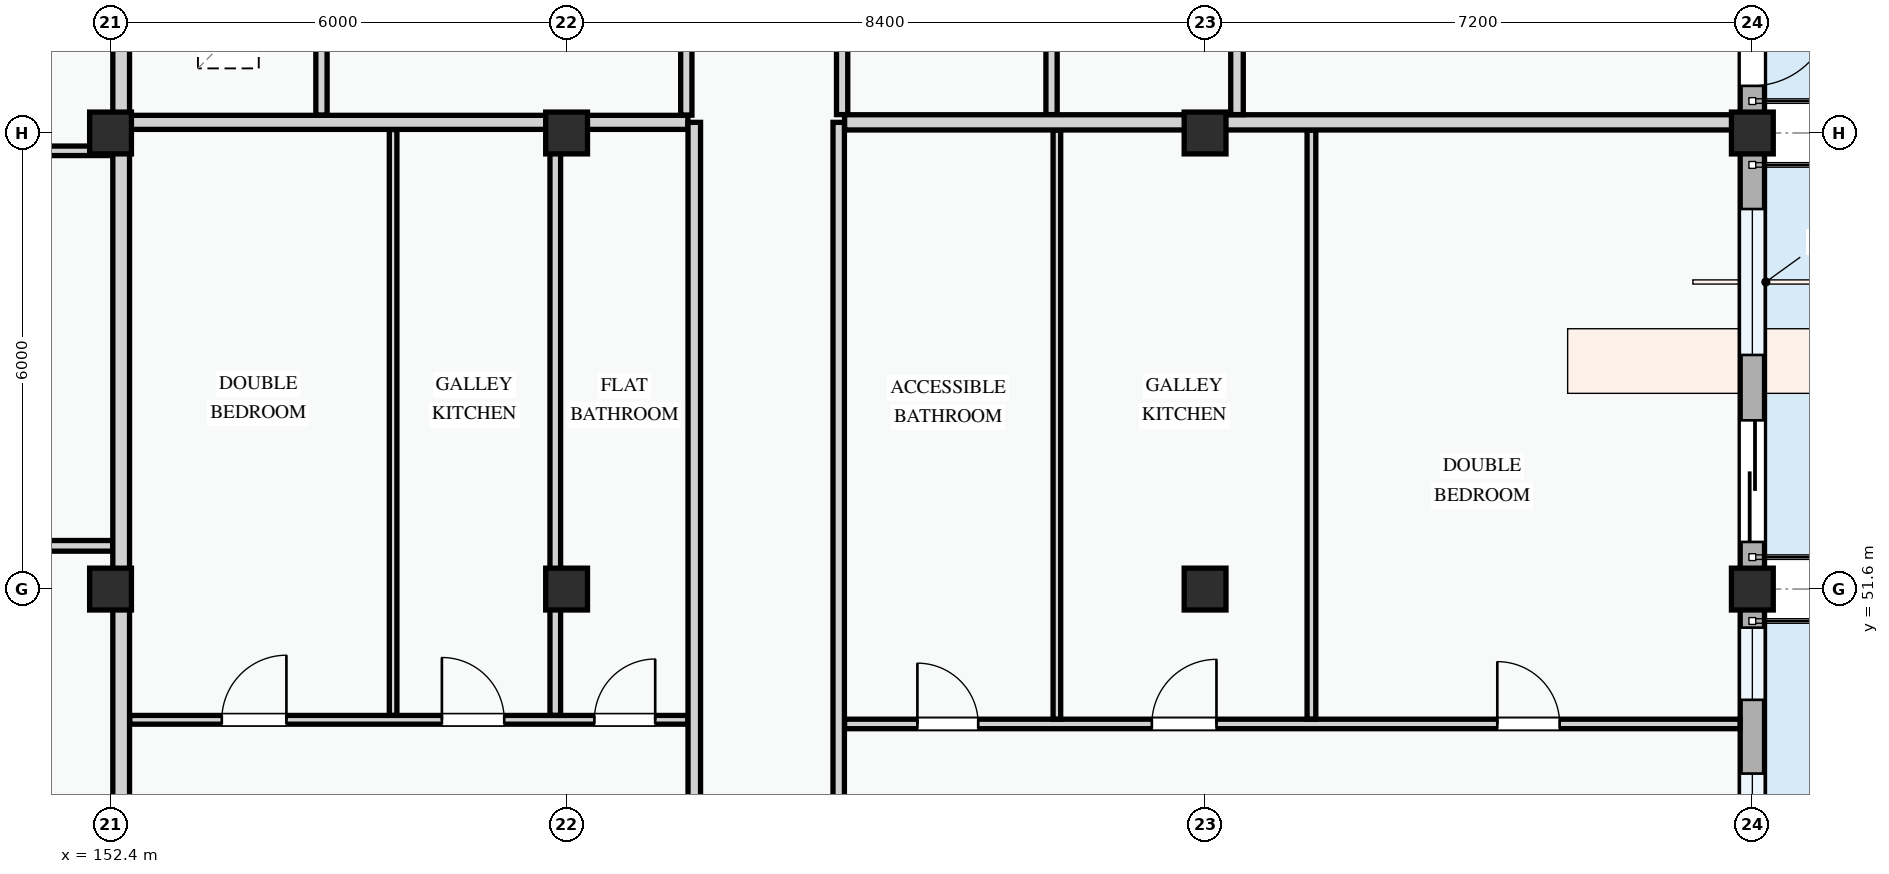
"""IFC4 building model, lengths in metres.
Left out: names, types, materials, properties, quantities, classifications, styles, units other than length and angle.
Written with IfcOpenShell. Run it as: python <this file> out.ifc"""

import sys

from ifc_helpers import new_model, si_unit, direction, frame, frame_2d, origin, origin_2d, place, context, subcontext, project, spatial, rectangle, extrude, element, fill, save


model = new_model("IFC4")
c1 = context("Model", 3, precision=1e-05, world=origin(), true_north=direction((0.0, 1.0)))
c2 = subcontext(c1, "Body", "Model", "MODEL_VIEW")
j1 = project(units=[si_unit("LENGTHUNIT", "METRE"), si_unit("PLANEANGLEUNIT", "RADIAN")], contexts=[c1])
p1 = place(None, origin())
s1 = spatial("IfcSite", under=j1, at=p1, CompositionType="ELEMENT")
p2 = place(p1, origin())
s2 = spatial("IfcBuilding", under=s1, at=p2, CompositionType="ELEMENT")
p3 = place(p2, frame((0.0, 0.0, 11.4)))
s3 = spatial("IfcBuildingStorey", under=s2, at=p3, CompositionType="ELEMENT", Elevation=11.4)
for number, where, z_axis, x_axis in (
    (1, (152.4, 51.6, 0.0), (0.0, 0.0, 1.0), (1.0, 0.0, 0.0)),
    (2, (152.4, 57.6, 0.0), (0.0, 0.0, 1.0), (1.0, 0.0, 0.0)),
    (3, (158.4, 51.6, 0.0), (0.0, 0.0, 1.0), (1.0, 0.0, 0.0)),
    (4, (158.4, 57.6, 0.0), (0.0, 0.0, 1.0), (1.0, 0.0, 0.0)),
    (5, (166.8, 51.6, 0.0), (0.0, 0.0, 1.0), (1.0, 0.0, 0.0)),
    (6, (166.8, 57.6, 0.0), (0.0, 0.0, 1.0), (1.0, 0.0, 0.0)),
    (7, (174.0, 51.6, 0.0), (0.0, 0.0, 1.0), (1.0, 0.0, 0.0)),
    (8, (174.0, 57.6, 0.0), (0.0, 0.0, 1.0), (1.0, 0.0, 0.0)),
):
    element("IfcColumn", number, at=place(p3, frame(where, z_axis=z_axis, x_axis=x_axis)), inside=s3, PredefinedType="COLUMN", context=c2, shape_type="SweptSolid", body=[
        extrude(rectangle(XDim=0.55, YDim=0.55, at=origin_2d()), origin(), (0.0, 0.0, 1.0), 3.3),
    ])
p4 = place(p3, frame((174.0, 43.2, 0.0), z_axis=(0.0, 0.0, 1.0), x_axis=(0.0, 1.0, 0.0)))
e9 = element("IfcWall", 9, at=p4, inside=s3, PredefinedType="STANDARD", context=c2, shape_type="SweptSolid", body=[
    extrude(rectangle(XDim=8.4, YDim=0.32, at=frame_2d((4.2, 0.0))), origin(), (0.0, 0.0, 1.0), 2.425),
])
p5 = place(p4, frame((2.15, 0.0, 0.0)))
e10 = element("IfcOpeningElement", 10, at=p5, cuts=e9, PredefinedType="OPENING", context=c2, shape_type="SweptSolid", body=[
    extrude(rectangle(XDim=1.5, YDim=2.2, at=frame_2d((0.75, 1.1))), frame((0.0, 0.17, 0.0), z_axis=(0.0, -1.0, 0.0), x_axis=(1.0, 0.0, 0.0)), (0.0, 0.0, 1.0), 0.34),
])
p6 = place(p4, frame((0.505, 0.0, 0.78)))
e11 = element("IfcOpeningElement", 11, at=p6, cuts=e9, PredefinedType="OPENING", context=c2, shape_type="SweptSolid", body=[
    extrude(rectangle(XDim=1.0, YDim=1.25, at=frame_2d((0.5, 0.625))), frame((0.0, 0.17, 0.0), z_axis=(0.0, -1.0, 0.0), x_axis=(1.0, 0.0, 0.0)), (0.0, 0.0, 1.0), 0.34),
])
p7 = place(p4, frame((4.353, 0.0, 0.78)))
e12 = element("IfcOpeningElement", 12, at=p7, cuts=e9, PredefinedType="OPENING", context=c2, shape_type="SweptSolid", body=[
    extrude(rectangle(XDim=1.62, YDim=1.38, at=frame_2d((0.81, 0.69))), frame((0.0, 0.17, 0.0), z_axis=(0.0, -1.0, 0.0), x_axis=(1.0, 0.0, 0.0)), (0.0, 0.0, 1.0), 0.34),
])
p8 = place(p4, frame((6.943, 0.0, 0.78)))
e13 = element("IfcOpeningElement", 13, at=p8, cuts=e9, PredefinedType="OPENING", context=c2, shape_type="SweptSolid", body=[
    extrude(rectangle(XDim=0.95, YDim=1.15, at=frame_2d((0.475, 0.575))), frame((0.0, 0.17, 0.0), z_axis=(0.0, -1.0, 0.0), x_axis=(1.0, 0.0, 0.0)), (0.0, 0.0, 1.0), 0.34),
])
p9 = place(p3, frame((174.0, 51.6, 0.0), z_axis=(0.0, 0.0, 1.0), x_axis=(0.0, 1.0, 0.0)))
e14 = element("IfcWall", 14, at=p9, inside=s3, PredefinedType="STANDARD", context=c2, shape_type="SweptSolid", body=[
    extrude(rectangle(XDim=6.0, YDim=0.32, at=frame_2d((3.0, 0.0))), origin(), (0.0, 0.0, 1.0), 2.575),
])
p10 = place(p9, frame((0.62, 0.0, 0.0)))
e15 = element("IfcOpeningElement", 15, at=p10, cuts=e14, PredefinedType="OPENING", context=c2, shape_type="SweptSolid", body=[
    extrude(rectangle(XDim=1.6, YDim=2.2, at=frame_2d((0.8, 1.1))), frame((0.0, 0.17, 0.0), z_axis=(0.0, -1.0, 0.0), x_axis=(1.0, 0.0, 0.0)), (0.0, 0.0, 1.0), 0.34),
])
p11 = place(p9, frame((3.08, 0.0, 0.78)))
e16 = element("IfcOpeningElement", 16, at=p11, cuts=e14, PredefinedType="OPENING", context=c2, shape_type="SweptSolid", body=[
    extrude(rectangle(XDim=1.92, YDim=1.44, at=frame_2d((0.96, 0.72))), frame((0.0, 0.17, 0.0), z_axis=(0.0, -1.0, 0.0), x_axis=(1.0, 0.0, 0.0)), (0.0, 0.0, 1.0), 0.34),
])
p12 = place(p3, frame((174.0, 57.6, 0.0), z_axis=(0.0, 0.0, 1.0), x_axis=(0.0, 1.0, 0.0)))
e17 = element("IfcWall", 17, at=p12, inside=s3, PredefinedType="STANDARD", context=c2, shape_type="SweptSolid", body=[
    extrude(rectangle(XDim=8.4, YDim=0.32, at=frame_2d((4.2, 0.0))), origin(), (0.0, 0.0, 1.0), 2.425),
])
p13 = place(p12, frame((0.62, 0.0, 0.0)))
e18 = element("IfcOpeningElement", 18, at=p13, cuts=e17, PredefinedType="OPENING", context=c2, shape_type="SweptSolid", body=[
    extrude(rectangle(XDim=1.05, YDim=2.15, at=frame_2d((0.525, 1.075))), frame((0.0, 0.17, 0.0), z_axis=(0.0, -1.0, 0.0), x_axis=(1.0, 0.0, 0.0)), (0.0, 0.0, 1.0), 0.34),
])
p14 = place(p12, frame((2.752, 0.0, 0.78)))
e19 = element("IfcOpeningElement", 19, at=p14, cuts=e17, PredefinedType="OPENING", context=c2, shape_type="SweptSolid", body=[
    extrude(rectangle(XDim=1.25, YDim=1.3, at=frame_2d((0.625, 0.65))), frame((0.0, 0.17, 0.0), z_axis=(0.0, -1.0, 0.0), x_axis=(1.0, 0.0, 0.0)), (0.0, 0.0, 1.0), 0.34),
])
p15 = place(p12, frame((5.762, 0.0, 0.78)))
e20 = element("IfcOpeningElement", 20, at=p15, cuts=e17, PredefinedType="OPENING", context=c2, shape_type="SweptSolid", body=[
    extrude(rectangle(XDim=1.58, YDim=1.48, at=frame_2d((0.79, 0.74))), frame((0.0, 0.17, 0.0), z_axis=(0.0, -1.0, 0.0), x_axis=(1.0, 0.0, 0.0)), (0.0, 0.0, 1.0), 0.34),
])
for number, where, z_axis, x_axis in (
    (21, (155.175, 61.724, 0.0), (0.0, 0.0, 1.0), (0.0, -1.0, 0.0)),
    (22, (159.975, 61.724, 0.0), (0.0, 0.0, 1.0), (0.0, -1.0, 0.0)),
):
    element("IfcWall", number, at=place(p3, frame(where, z_axis=z_axis, x_axis=x_axis)), inside=s3, PredefinedType="PARTITIONING", context=c2, shape_type="SweptSolid", body=[
        extrude(rectangle(XDim=3.89, YDim=0.148, at=frame_2d((1.945, 0.0))), origin(), (0.0, 0.0, 1.0), 3.0),
    ])
for number, where, z_axis, x_axis in (
    (23, (162.025, 61.724, 0.0), (0.0, 0.0, 1.0), (0.0, -1.0, 0.0)),
    (24, (164.78, 61.724, 0.0), (0.0, 0.0, 1.0), (0.0, -1.0, 0.0)),
):
    element("IfcWall", number, at=place(p3, frame(where, z_axis=z_axis, x_axis=x_axis)), inside=s3, PredefinedType="PARTITIONING", context=c2, shape_type="SweptSolid", body=[
        extrude(rectangle(XDim=3.882, YDim=0.148, at=frame_2d((1.941, 0.0))), origin(), (0.0, 0.0, 1.0), 3.0),
    ])
p16 = place(p3, frame((152.652, 49.88, 0.0), z_axis=(0.0, 0.0, 1.0), x_axis=(1.0, 0.0, 0.0)))
e25 = element("IfcWall", 25, at=p16, inside=s3, PredefinedType="PARTITIONING", context=c2, shape_type="SweptSolid", body=[
    extrude(rectangle(XDim=7.344, YDim=0.115, at=frame_2d((3.672, 0.0))), origin(), (0.0, 0.0, 1.0), 3.0),
])
p17 = place(p16, frame((1.212, 0.0, 0.0)))
e26 = element("IfcOpeningElement", 26, at=p17, cuts=e25, PredefinedType="OPENING", context=c2, shape_type="SweptSolid", body=[
    extrude(rectangle(XDim=0.85, YDim=2.1, at=frame_2d((0.425, 1.05))), frame((0.0, 0.067, 0.0), z_axis=(0.0, -1.0, 0.0), x_axis=(1.0, 0.0, 0.0)), (0.0, 0.0, 1.0), 0.135),
])
p18 = place(p16, frame((4.107, 0.0, 0.0)))
e27 = element("IfcOpeningElement", 27, at=p18, cuts=e25, PredefinedType="OPENING", context=c2, shape_type="SweptSolid", body=[
    extrude(rectangle(XDim=0.82, YDim=2.08, at=frame_2d((0.41, 1.04))), frame((0.0, 0.067, 0.0), z_axis=(0.0, -1.0, 0.0), x_axis=(1.0, 0.0, 0.0)), (0.0, 0.0, 1.0), 0.135),
])
p19 = place(p16, frame((6.114, 0.0, 0.0)))
e28 = element("IfcOpeningElement", 28, at=p19, cuts=e25, PredefinedType="OPENING", context=c2, shape_type="SweptSolid", body=[
    extrude(rectangle(XDim=0.8, YDim=2.1, at=frame_2d((0.4, 1.05))), frame((0.0, 0.067, 0.0), z_axis=(0.0, -1.0, 0.0), x_axis=(1.0, 0.0, 0.0)), (0.0, 0.0, 1.0), 0.135),
])
p20 = place(p3, frame((156.118, 49.939, 0.0), z_axis=(0.0, 0.0, 1.0), x_axis=(0.0, 1.0, 0.0)))
e29 = element("IfcWall", 29, at=p20, inside=s3, PredefinedType="PARTITIONING", context=c2, shape_type="SweptSolid", body=[
    extrude(rectangle(XDim=7.706, YDim=0.1, at=frame_2d((3.853, 0.0))), origin(), (0.0, 0.0, 1.0), 3.0),
])
p21 = place(p3, frame((158.251, 49.939, 0.0), z_axis=(0.0, 0.0, 1.0), x_axis=(0.0, 1.0, 0.0)))
e30 = element("IfcWall", 30, at=p21, inside=s3, PredefinedType="PARTITIONING", context=c2, shape_type="SweptSolid", body=[
    extrude(rectangle(XDim=7.706, YDim=0.14, at=frame_2d((3.853, 0.0))), origin(), (0.0, 0.0, 1.0), 2.425),
])
p22 = place(p3, frame((162.057, 49.826, 0.0), z_axis=(0.0, 0.0, 1.0), x_axis=(1.0, 0.0, 0.0)))
e31 = element("IfcWall", 31, at=p22, inside=s3, PredefinedType="PARTITIONING", context=c2, shape_type="SweptSolid", body=[
    extrude(rectangle(XDim=11.781, YDim=0.125, at=frame_2d((5.891, 0.0))), origin(), (0.0, 0.0, 1.0), 3.0),
])
p23 = place(p22, frame((0.958, 0.0, 0.0)))
e32 = element("IfcOpeningElement", 32, at=p23, cuts=e31, PredefinedType="OPENING", context=c2, shape_type="SweptSolid", body=[
    extrude(rectangle(XDim=0.8, YDim=2.1, at=frame_2d((0.4, 1.05))), frame((0.0, 0.073, 0.0), z_axis=(0.0, -1.0, 0.0), x_axis=(1.0, 0.0, 0.0)), (0.0, 0.0, 1.0), 0.145),
])
p24 = place(p22, frame((4.043, 0.0, 0.0)))
e33 = element("IfcOpeningElement", 33, at=p24, cuts=e31, PredefinedType="OPENING", context=c2, shape_type="SweptSolid", body=[
    extrude(rectangle(XDim=0.85, YDim=2.1, at=frame_2d((0.425, 1.05))), frame((0.0, 0.073, 0.0), z_axis=(0.0, -1.0, 0.0), x_axis=(1.0, 0.0, 0.0)), (0.0, 0.0, 1.0), 0.145),
])
p25 = place(p22, frame((8.588, 0.0, 0.0)))
e34 = element("IfcOpeningElement", 34, at=p25, cuts=e31, PredefinedType="OPENING", context=c2, shape_type="SweptSolid", body=[
    extrude(rectangle(XDim=0.82, YDim=2.08, at=frame_2d((0.41, 1.04))), frame((0.0, 0.073, 0.0), z_axis=(0.0, -1.0, 0.0), x_axis=(1.0, 0.0, 0.0)), (0.0, 0.0, 1.0), 0.145),
])
p26 = place(p3, frame((168.199, 49.89, 0.0), z_axis=(0.0, 0.0, 1.0), x_axis=(0.0, 1.0, 0.0)))
e35 = element("IfcWall", 35, at=p26, inside=s3, PredefinedType="PARTITIONING", context=c2, shape_type="SweptSolid", body=[
    extrude(rectangle(XDim=7.748, YDim=0.115, at=frame_2d((3.874, 0.0))), origin(), (0.0, 0.0, 1.0), 3.0),
])
p27 = place(p3, frame((164.85, 49.89, 0.0), z_axis=(0.0, 0.0, 1.0), x_axis=(0.0, 1.0, 0.0)))
e36 = element("IfcWall", 36, at=p27, inside=s3, PredefinedType="PARTITIONING", context=c2, shape_type="SweptSolid", body=[
    extrude(rectangle(XDim=7.748, YDim=0.1, at=frame_2d((3.874, 0.0))), origin(), (0.0, 0.0, 1.0), 3.0),
])
p28 = place(p3, frame((152.652, 57.74, 0.0), z_axis=(0.0, 0.0, 1.0), x_axis=(1.0, 0.0, 0.0)))
e37 = element("IfcWall", 37, at=p28, inside=s3, PredefinedType="PARTITIONING", context=c2, shape_type="SweptSolid", body=[
    extrude(rectangle(XDim=7.344, YDim=0.185, at=frame_2d((3.672, 0.0))), origin(), (0.0, 0.0, 1.0), 2.375),
])
p29 = place(p3, frame((162.057, 57.74, 0.0), z_axis=(0.0, 0.0, 1.0), x_axis=(1.0, 0.0, 0.0)))
e38 = element("IfcWall", 38, at=p29, inside=s3, PredefinedType="PARTITIONING", context=c2, shape_type="SweptSolid", body=[
    extrude(rectangle(XDim=11.781, YDim=0.2, at=frame_2d((5.891, 0.0))), origin(), (0.0, 0.0, 1.0), 2.375),
])
p30 = place(p3, frame((160.08, 37.362, 0.0), z_axis=(0.0, 0.0, 1.0), x_axis=(0.0, 1.0, 0.0)))
e39 = element("IfcWall", 39, at=p30, inside=s3, PredefinedType="PARTITIONING", context=c2, shape_type="SweptSolid", body=[
    extrude(rectangle(XDim=20.378, YDim=0.165, at=frame_2d((10.189, 0.0))), origin(), (0.0, 0.0, 1.0), 3.0),
])
p31 = place(p30, frame((2.341, 0.0, 0.0)))
e40 = element("IfcOpeningElement", 40, at=p31, cuts=e39, PredefinedType="OPENING", context=c2, shape_type="SweptSolid", body=[
    extrude(rectangle(XDim=0.92, YDim=2.1, at=frame_2d((0.46, 1.05))), frame((0.0, 0.093, 0.0), z_axis=(0.0, -1.0, 0.0), x_axis=(1.0, 0.0, 0.0)), (0.0, 0.0, 1.0), 0.185),
])
p32 = place(p30, frame((9.608, 0.0, 0.0)))
e41 = element("IfcOpeningElement", 41, at=p32, cuts=e39, PredefinedType="OPENING", context=c2, shape_type="SweptSolid", body=[
    extrude(rectangle(XDim=0.92, YDim=2.1, at=frame_2d((0.46, 1.05))), frame((0.0, 0.093, 0.0), z_axis=(0.0, -1.0, 0.0), x_axis=(1.0, 0.0, 0.0)), (0.0, 0.0, 1.0), 0.185),
])
p33 = place(p3, frame((161.98, 37.362, 0.0), z_axis=(0.0, 0.0, 1.0), x_axis=(0.0, 1.0, 0.0)))
e42 = element("IfcWall", 42, at=p33, inside=s3, PredefinedType="PARTITIONING", context=c2, shape_type="SweptSolid", body=[
    extrude(rectangle(XDim=20.378, YDim=0.15, at=frame_2d((10.189, 0.0))), origin(), (0.0, 0.0, 1.0), 3.0),
])
p34 = place(p33, frame((2.342, 0.0, 0.0)))
e43 = element("IfcOpeningElement", 43, at=p34, cuts=e42, PredefinedType="OPENING", context=c2, shape_type="SweptSolid", body=[
    extrude(rectangle(XDim=0.92, YDim=2.1, at=frame_2d((0.46, 1.05))), frame((0.0, 0.085, 0.0), z_axis=(0.0, -1.0, 0.0), x_axis=(1.0, 0.0, 0.0)), (0.0, 0.0, 1.0), 0.17),
])
p35 = place(p33, frame((9.581, 0.0, 0.0)))
e44 = element("IfcOpeningElement", 44, at=p35, cuts=e42, PredefinedType="OPENING", context=c2, shape_type="SweptSolid", body=[
    extrude(rectangle(XDim=0.96, YDim=2.12, at=frame_2d((0.48, 1.06))), frame((0.0, 0.085, 0.0), z_axis=(0.0, -1.0, 0.0), x_axis=(1.0, 0.0, 0.0)), (0.0, 0.0, 1.0), 0.17),
])
p36 = place(p3, frame((167.22, 57.842, 0.0), z_axis=(0.0, 0.0, 1.0), x_axis=(0.0, 1.0, 0.0)))
e45 = element("IfcWall", 45, at=p36, inside=s3, PredefinedType="PARTITIONING", context=c2, shape_type="SweptSolid", body=[
    extrude(rectangle(XDim=14.018, YDim=0.165, at=frame_2d((7.009, 0.0))), origin(), (0.0, 0.0, 1.0), 2.425),
])
p37 = place(p36, frame((2.448, 0.0, 0.0)))
e46 = element("IfcOpeningElement", 46, at=p37, cuts=e45, PredefinedType="OPENING", context=c2, shape_type="SweptSolid", body=[
    extrude(rectangle(XDim=0.92, YDim=2.1, at=frame_2d((0.46, 1.05))), frame((0.0, 0.093, 0.0), z_axis=(0.0, -1.0, 0.0), x_axis=(1.0, 0.0, 0.0)), (0.0, 0.0, 1.0), 0.185),
])
p38 = place(p3, frame((145.852, 52.169, 0.0), z_axis=(0.0, 0.0, 1.0), x_axis=(1.0, 0.0, 0.0)))
e47 = element("IfcWall", 47, at=p38, inside=s3, PredefinedType="PARTITIONING", context=c2, shape_type="SweptSolid", body=[
    extrude(rectangle(XDim=6.576, YDim=0.14, at=frame_2d((3.288, 0.0))), origin(), (0.0, 0.0, 1.0), 3.0),
])
p39 = place(p3, frame((145.852, 57.365, 0.0), z_axis=(0.0, 0.0, 1.0), x_axis=(1.0, 0.0, 0.0)))
e48 = element("IfcWall", 48, at=p39, inside=s3, PredefinedType="PARTITIONING", context=c2, shape_type="SweptSolid", body=[
    extrude(rectangle(XDim=6.576, YDim=0.125, at=frame_2d((3.288, 0.0))), origin(), (0.0, 0.0, 1.0), 2.375),
])
p40 = place(p3, frame((152.54, 43.26, 0.0), z_axis=(0.0, 0.0, 1.0), x_axis=(0.0, 1.0, 0.0)))
e49 = element("IfcWall", 49, at=p40, inside=s3, PredefinedType="PARTITIONING", context=c2, shape_type="SweptSolid", body=[
    extrude(rectangle(XDim=18.464, YDim=0.22, at=frame_2d((9.232, 0.0))), origin(), (0.0, 0.0, 1.0), 2.425),
])
p41 = place(p7, origin())
e50 = element("IfcWindow", 50, at=p41, inside=s3, PartitioningType="DOUBLE_PANEL_VERTICAL", PredefinedType="WINDOW", context=c2, shape_type="SweptSolid", body=[
    extrude(rectangle(XDim=1.62, YDim=1.38, at=frame_2d((0.81, 0.69))), frame((0.0, 0.03, 0.0), z_axis=(0.0, -1.0, 0.0), x_axis=(1.0, 0.0, 0.0)), (0.0, 0.0, 1.0), 0.06),
])
fill(e12, e50)
p42 = place(p8, origin())
e51 = element("IfcWindow", 51, at=p42, inside=s3, PartitioningType="SINGLE_PANEL", PredefinedType="WINDOW", context=c2, shape_type="SweptSolid", body=[
    extrude(rectangle(XDim=0.95, YDim=1.15, at=frame_2d((0.475, 0.575))), frame((0.0, 0.03, 0.0), z_axis=(0.0, -1.0, 0.0), x_axis=(1.0, 0.0, 0.0)), (0.0, 0.0, 1.0), 0.06),
])
fill(e13, e51)
p43 = place(p10, frame((1.6, 0.0, 0.0), z_axis=(0.0, 0.0, 1.0), x_axis=(-1.0, 0.0, 0.0)))
e52 = element("IfcDoor", 52, at=p43, inside=s3, OperationType="SLIDING_TO_LEFT", PredefinedType="DOOR", context=c2, shape_type="SweptSolid", body=[
    extrude(rectangle(XDim=1.6, YDim=2.2, at=frame_2d((0.8, 1.1))), frame((0.0, 0.025, 0.0), z_axis=(0.0, -1.0, 0.0), x_axis=(1.0, 0.0, 0.0)), (0.0, 0.0, 1.0), 0.05),
])
fill(e15, e52)
p44 = place(p11, origin())
e53 = element("IfcWindow", 53, at=p44, inside=s3, PartitioningType="DOUBLE_PANEL_VERTICAL", PredefinedType="WINDOW", context=c2, shape_type="SweptSolid", body=[
    extrude(rectangle(XDim=1.92, YDim=1.44, at=frame_2d((0.96, 0.72))), frame((0.0, 0.03, 0.0), z_axis=(0.0, -1.0, 0.0), x_axis=(1.0, 0.0, 0.0)), (0.0, 0.0, 1.0), 0.06),
])
fill(e16, e53)
p45 = place(p13, frame((1.05, 0.0, 0.0), z_axis=(0.0, 0.0, 1.0), x_axis=(-1.0, 0.0, 0.0)))
e54 = element("IfcDoor", 54, at=p45, inside=s3, OperationType="SINGLE_SWING_LEFT", PredefinedType="DOOR", context=c2, shape_type="SweptSolid", body=[
    extrude(rectangle(XDim=1.05, YDim=2.15, at=frame_2d((0.525, 1.075))), frame((0.0, 0.025, 0.0), z_axis=(0.0, -1.0, 0.0), x_axis=(1.0, 0.0, 0.0)), (0.0, 0.0, 1.0), 0.05),
])
fill(e18, e54)
p46 = place(p17, origin())
e55 = element("IfcDoor", 55, at=p46, inside=s3, OperationType="SINGLE_SWING_RIGHT", PredefinedType="DOOR", context=c2, shape_type="SweptSolid", body=[
    extrude(rectangle(XDim=0.85, YDim=2.1, at=frame_2d((0.425, 1.05))), frame((0.0, 0.025, 0.0), z_axis=(0.0, -1.0, 0.0), x_axis=(1.0, 0.0, 0.0)), (0.0, 0.0, 1.0), 0.05),
])
fill(e26, e55)
p47 = place(p18, origin())
e56 = element("IfcDoor", 56, at=p47, inside=s3, OperationType="SINGLE_SWING_LEFT", PredefinedType="DOOR", context=c2, shape_type="SweptSolid", body=[
    extrude(rectangle(XDim=0.82, YDim=2.08, at=frame_2d((0.41, 1.04))), frame((0.0, 0.025, 0.0), z_axis=(0.0, -1.0, 0.0), x_axis=(1.0, 0.0, 0.0)), (0.0, 0.0, 1.0), 0.05),
])
fill(e27, e56)
p48 = place(p19, origin())
e57 = element("IfcDoor", 57, at=p48, inside=s3, OperationType="SINGLE_SWING_RIGHT", PredefinedType="DOOR", context=c2, shape_type="SweptSolid", body=[
    extrude(rectangle(XDim=0.8, YDim=2.1, at=frame_2d((0.4, 1.05))), frame((0.0, 0.025, 0.0), z_axis=(0.0, -1.0, 0.0), x_axis=(1.0, 0.0, 0.0)), (0.0, 0.0, 1.0), 0.05),
])
fill(e28, e57)
p49 = place(p23, origin())
e58 = element("IfcDoor", 58, at=p49, inside=s3, OperationType="SINGLE_SWING_LEFT", PredefinedType="DOOR", context=c2, shape_type="SweptSolid", body=[
    extrude(rectangle(XDim=0.8, YDim=2.1, at=frame_2d((0.4, 1.05))), frame((0.0, 0.025, 0.0), z_axis=(0.0, -1.0, 0.0), x_axis=(1.0, 0.0, 0.0)), (0.0, 0.0, 1.0), 0.05),
])
fill(e32, e58)
p50 = place(p24, origin())
e59 = element("IfcDoor", 59, at=p50, inside=s3, OperationType="SINGLE_SWING_RIGHT", PredefinedType="DOOR", context=c2, shape_type="SweptSolid", body=[
    extrude(rectangle(XDim=0.85, YDim=2.1, at=frame_2d((0.425, 1.05))), frame((0.0, 0.025, 0.0), z_axis=(0.0, -1.0, 0.0), x_axis=(1.0, 0.0, 0.0)), (0.0, 0.0, 1.0), 0.05),
])
fill(e33, e59)
p51 = place(p25, origin())
e60 = element("IfcDoor", 60, at=p51, inside=s3, OperationType="SINGLE_SWING_LEFT", PredefinedType="DOOR", context=c2, shape_type="SweptSolid", body=[
    extrude(rectangle(XDim=0.82, YDim=2.08, at=frame_2d((0.41, 1.04))), frame((0.0, 0.025, 0.0), z_axis=(0.0, -1.0, 0.0), x_axis=(1.0, 0.0, 0.0)), (0.0, 0.0, 1.0), 0.05),
])
fill(e34, e60)
save(model, sys.argv[1])
